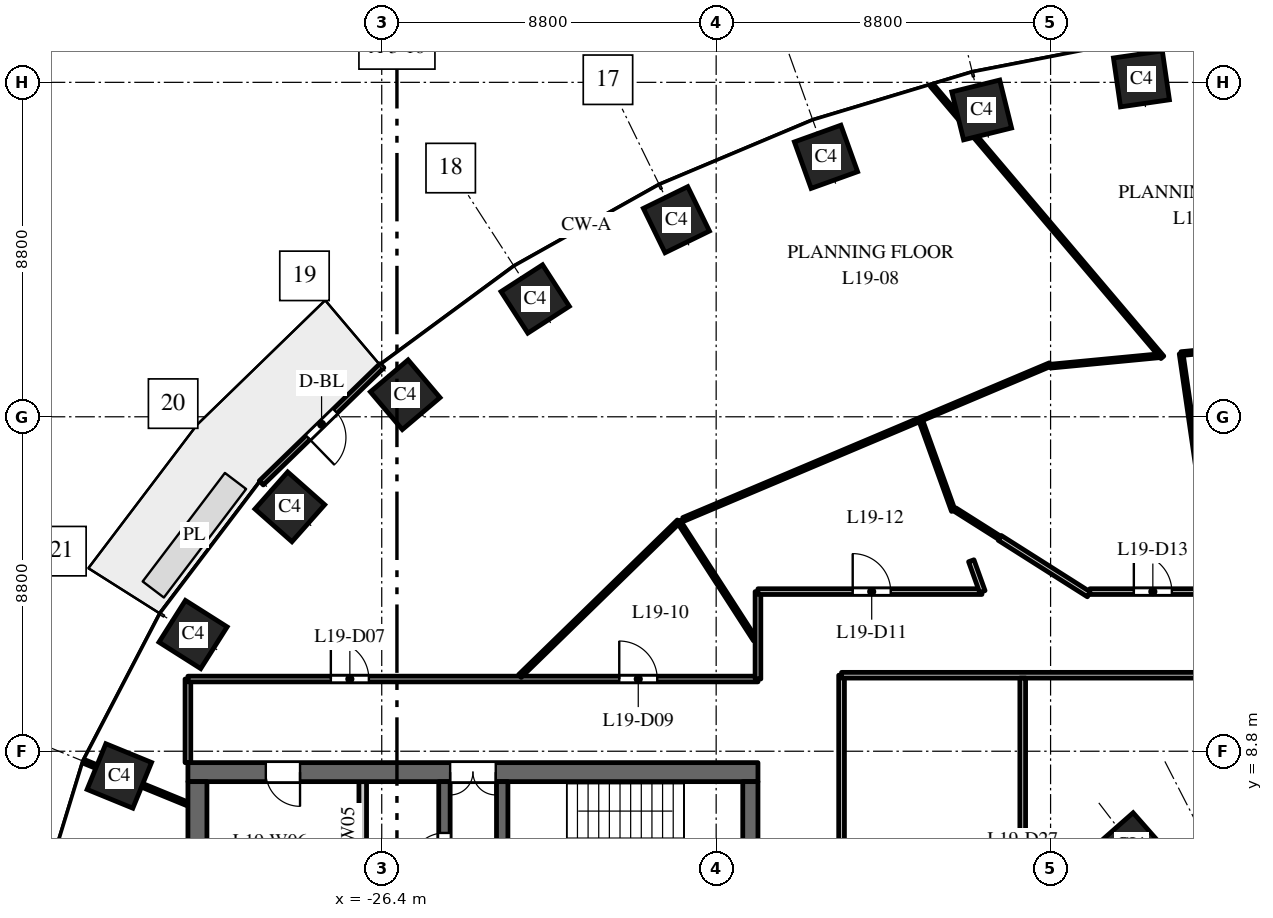
"""IFC4 building model, lengths in metres.
Left out: names, types, materials, properties, quantities, classifications, styles, units other than length and angle.
Written with IfcOpenShell. Run it as: python <this file> out.ifc"""

import sys

from ifc_helpers import new_model, si_unit, direction, frame, frame_2d, origin, origin_2d, place, context, subcontext, project, spatial, rectangle, extrude, element, fill, save


model = new_model("IFC4")
c1 = context("Model", 3, precision=1e-05, world=origin(), true_north=direction((0.0, 1.0)))
c2 = subcontext(c1, "Body", "Model", "MODEL_VIEW")
j1 = project(units=[si_unit("LENGTHUNIT", "METRE"), si_unit("PLANEANGLEUNIT", "RADIAN")], contexts=[c1])
p1 = place(None, origin())
s1 = spatial("IfcSite", under=j1, at=p1, CompositionType="ELEMENT")
p2 = place(p1, origin())
s2 = spatial("IfcBuilding", under=s1, at=p2, CompositionType="ELEMENT")
p3 = place(p2, frame((0.0, 0.0, 88.0)))
s3 = spatial("IfcBuildingStorey", under=s2, at=p3, CompositionType="ELEMENT", Elevation=88.0)
for number, where, z_axis, x_axis in (
    (1, (-6.409, 26.491, 0.0), (0.0, 0.0, 1.0), (-0.99, -0.143, 0.0)),
    (2, (-10.613, 25.674, 0.0), (0.0, 0.0, 1.0), (-0.971, -0.24, 0.0)),
    (3, (-14.709, 24.441, 0.0), (0.0, 0.0, 1.0), (-0.941, -0.338, 0.0)),
    (4, (-18.646, 22.785, 0.0), (0.0, 0.0, 1.0), (-0.898, -0.439, 0.0)),
    (5, (-22.362, 20.7, 0.0), (0.0, 0.0, 1.0), (-0.84, -0.542, 0.0)),
    (6, (-25.783, 18.18, 0.0), (0.0, 0.0, 1.0), (-0.763, -0.646, 0.0)),
    (7, (-28.819, 15.23, 0.0), (0.0, 0.0, 1.0), (-0.663, -0.749, 0.0)),
    (8, (-31.365, 11.871, 0.0), (0.0, 0.0, 1.0), (-0.535, -0.845, 0.0)),
    (9, (-33.305, 8.149, 0.0), (0.0, 0.0, 1.0), (-0.379, -0.925, 0.0)),
):
    element("IfcColumn", number, at=place(p3, frame(where, z_axis=z_axis, x_axis=x_axis)), inside=s3, PredefinedType="COLUMN", context=c2, shape_type="SweptSolid", body=[
        extrude(rectangle(XDim=1.3, YDim=1.3, at=origin_2d()), origin(), (0.0, 0.0, 1.0), 4.0),
    ])
p4 = place(p3, frame((-6.682, 6.334, 0.0), z_axis=(0.0, 0.0, 1.0), x_axis=(-0.75102249095, -0.660276622399, 0.0)))
e10 = element("IfcColumn", 10, at=p4, inside=s3, PredefinedType="COLUMN", context=c2, shape_type="SweptSolid", body=[
    extrude(rectangle(XDim=1.2, YDim=1.2, at=origin_2d()), origin(), (0.0, 0.0, 1.0), 4.0),
])
p5 = place(p3, frame((-16.5, 8.25, 0.0), z_axis=(0.0, 0.0, 1.0), x_axis=(-1.0, 0.0, 0.0)))
e11 = element("IfcWall", 11, at=p5, inside=s3, PredefinedType="SHEAR", context=c2, shape_type="SweptSolid", body=[
    extrude(rectangle(XDim=15.0, YDim=0.5, at=frame_2d((7.5, 0.0))), origin(), (0.0, 0.0, 1.0), 3.7),
])
p6 = place(p5, frame((6.9, 0.0, 0.0)))
e12 = element("IfcOpeningElement", 12, at=p6, cuts=e11, PredefinedType="OPENING", context=c2, shape_type="SweptSolid", body=[
    extrude(rectangle(XDim=1.2, YDim=2.1, at=frame_2d((0.6, 1.05))), frame((0.0, 0.26, 0.0), z_axis=(0.0, -1.0, 0.0), x_axis=(1.0, 0.0, 0.0)), (0.0, 0.0, 1.0), 0.52),
])
p7 = place(p5, frame((12.05, 0.0, 0.0)))
e13 = element("IfcOpeningElement", 13, at=p7, cuts=e11, PredefinedType="OPENING", context=c2, shape_type="SweptSolid", body=[
    extrude(rectangle(XDim=0.9, YDim=2.1, at=frame_2d((0.45, 1.05))), frame((0.0, 0.26, 0.0), z_axis=(0.0, -1.0, 0.0), x_axis=(1.0, 0.0, 0.0)), (0.0, 0.0, 1.0), 0.52),
])
p8 = place(p3, frame((-24.75, -8.0, 0.0), z_axis=(0.0, 0.0, 1.0), x_axis=(0.0, 1.0, 0.0)))
e14 = element("IfcWall", 14, at=p8, inside=s3, PredefinedType="SHEAR", context=c2, shape_type="SweptSolid", body=[
    extrude(rectangle(XDim=16.0, YDim=0.3, at=frame_2d((8.0, 0.0))), origin(), (0.0, 0.0, 1.0), 3.7),
])
p9 = place(p8, frame((4.425, 0.0, 0.0)))
e15 = element("IfcOpeningElement", 15, at=p9, cuts=e14, PredefinedType="OPENING", context=c2, shape_type="SweptSolid", body=[
    extrude(rectangle(XDim=1.1, YDim=2.1, at=frame_2d((0.55, 1.05))), frame((0.0, 0.16, 0.0), z_axis=(0.0, -1.0, 0.0), x_axis=(1.0, 0.0, 0.0)), (0.0, 0.0, 1.0), 0.32),
])
p10 = place(p8, frame((7.45, 0.0, 0.0)))
e16 = element("IfcOpeningElement", 16, at=p10, cuts=e14, PredefinedType="OPENING", context=c2, shape_type="SweptSolid", body=[
    extrude(rectangle(XDim=1.1, YDim=2.1, at=frame_2d((0.55, 1.05))), frame((0.0, 0.16, 0.0), z_axis=(0.0, -1.0, 0.0), x_axis=(1.0, 0.0, 0.0)), (0.0, 0.0, 1.0), 0.32),
])
p11 = place(p8, frame((10.425, 0.0, 0.0)))
e17 = element("IfcOpeningElement", 17, at=p11, cuts=e14, PredefinedType="OPENING", context=c2, shape_type="SweptSolid", body=[
    extrude(rectangle(XDim=1.2, YDim=2.1, at=frame_2d((0.6, 1.05))), frame((0.0, 0.16, 0.0), z_axis=(0.0, -1.0, 0.0), x_axis=(1.0, 0.0, 0.0)), (0.0, 0.0, 1.0), 0.32),
])
p12 = place(p8, frame((13.75, 0.0, 0.0)))
e18 = element("IfcOpeningElement", 18, at=p12, cuts=e14, PredefinedType="OPENING", context=c2, shape_type="SweptSolid", body=[
    extrude(rectangle(XDim=0.9, YDim=2.1, at=frame_2d((0.45, 1.05))), frame((0.0, 0.16, 0.0), z_axis=(0.0, -1.0, 0.0), x_axis=(1.0, 0.0, 0.0)), (0.0, 0.0, 1.0), 0.32),
])
p13 = place(p8, frame((1.35, 0.0, 0.0)))
e19 = element("IfcOpeningElement", 19, at=p13, cuts=e14, PredefinedType="OPENING", context=c2, shape_type="SweptSolid", body=[
    extrude(rectangle(XDim=0.9, YDim=2.1, at=frame_2d((0.45, 1.05))), frame((0.0, 0.16, 0.0), z_axis=(0.0, -1.0, 0.0), x_axis=(1.0, 0.0, 0.0)), (0.0, 0.0, 1.0), 0.32),
])
p14 = place(p3, frame((-16.7, -8.0, 0.0), z_axis=(0.0, 0.0, 1.0), x_axis=(0.0, 1.0, 0.0)))
e20 = element("IfcWall", 20, at=p14, inside=s3, PredefinedType="SHEAR", context=c2, shape_type="SweptSolid", body=[
    extrude(rectangle(XDim=16.0, YDim=0.4, at=frame_2d((8.0, 0.0))), origin(), (0.0, 0.0, 1.0), 3.7),
])
p15 = place(p3, frame((-31.25, -8.0, 0.0), z_axis=(0.0, 0.0, 1.0), x_axis=(0.0, 1.0, 0.0)))
e21 = element("IfcWall", 21, at=p15, inside=s3, PredefinedType="SHEAR", context=c2, shape_type="SweptSolid", body=[
    extrude(rectangle(XDim=16.0, YDim=0.5, at=frame_2d((8.0, 0.0))), origin(), (0.0, 0.0, 1.0), 3.7),
])
p16 = place(p3, frame((-26.9, 4.75, 0.0), z_axis=(0.0, 0.0, 1.0), x_axis=(0.0, 1.0, 0.0)))
e22 = element("IfcWall", 22, at=p16, inside=s3, PredefinedType="PARTITIONING", context=c2, shape_type="SweptSolid", body=[
    extrude(rectangle(XDim=3.25, YDim=0.2, at=frame_2d((1.625, 0.0))), origin(), (0.0, 0.0, 1.0), 3.7),
])
p17 = place(p3, frame((-23.23, 2.25, 0.0), z_axis=(0.0, 0.0, 1.0), x_axis=(0.0, 1.0, 0.0)))
e23 = element("IfcWall", 23, at=p17, inside=s3, PredefinedType="SHEAR", context=c2, shape_type="SweptSolid", body=[
    extrude(rectangle(XDim=5.75, YDim=0.3, at=frame_2d((2.875, 0.0))), origin(), (0.0, 0.0, 1.0), 3.7),
])
p18 = place(p17, frame((0.6, 0.0, 0.0)))
e24 = element("IfcOpeningElement", 24, at=p18, cuts=e23, PredefinedType="OPENING", context=c2, shape_type="SweptSolid", body=[
    extrude(rectangle(XDim=1.0, YDim=2.1, at=frame_2d((0.5, 1.05))), frame((0.0, 0.16, 0.0), z_axis=(0.0, -1.0, 0.0), x_axis=(1.0, 0.0, 0.0)), (0.0, 0.0, 1.0), 0.32),
])
p19 = place(p3, frame((-26.396, 18.943, 0.0), z_axis=(0.0, 0.0, 1.0), x_axis=(-0.717214761864, -0.696852197647, 0.0)))
e25 = element("IfcWall", 25, at=p19, inside=s3, PredefinedType="STANDARD", context=c2, shape_type="SweptSolid", body=[
    extrude(rectangle(XDim=4.424, YDim=0.15, at=frame_2d((2.212, 0.0))), origin(), (0.0, 0.0, 1.0), 3.7),
])
p20 = place(p19, frame((1.712, 0.0, 0.0)))
e26 = element("IfcOpeningElement", 26, at=p20, cuts=e25, PredefinedType="OPENING", context=c2, shape_type="SweptSolid", body=[
    extrude(rectangle(XDim=1.0, YDim=2.4, at=frame_2d((0.5, 1.2))), frame((0.0, 0.085, 0.0), z_axis=(0.0, -1.0, 0.0), x_axis=(1.0, 0.0, 0.0)), (0.0, 0.0, 1.0), 0.17),
])
p21 = place(p3, frame((-34.234, 8.53, 0.0), z_axis=(0.0, 0.0, 1.0), x_axis=(0.925344112436, -0.379128307542, 0.0)))
e27 = element("IfcWall", 27, at=p21, inside=s3, PredefinedType="PARTITIONING", context=c2, shape_type="SweptSolid", body=[
    extrude(rectangle(XDim=2.954, YDim=0.1, at=frame_2d((1.477, 0.0))), origin(), (0.0, 0.0, 1.0), 2.9),
])
p22 = place(p3, frame((-31.5, 8.5, 0.0), z_axis=(0.0, 0.0, 1.0), x_axis=(0.0, 1.0, 0.0)))
e28 = element("IfcWall", 28, at=p22, inside=s3, PredefinedType="PARTITIONING", context=c2, shape_type="SweptSolid", body=[
    extrude(rectangle(XDim=2.2, YDim=0.15, at=frame_2d((1.1, 0.0))), origin(), (0.0, 0.0, 1.0), 3.7),
])
p23 = place(p3, frame((-31.5, 10.7, 0.0), z_axis=(0.0, 0.0, 1.0), x_axis=(1.0, 0.0, 0.0)))
e29 = element("IfcWall", 29, at=p23, inside=s3, PredefinedType="PARTITIONING", context=c2, shape_type="SweptSolid", body=[
    extrude(rectangle(XDim=15.0, YDim=0.15, at=frame_2d((7.5, 0.0))), origin(), (0.0, 0.0, 1.0), 3.1),
])
p24 = place(p23, frame((3.761, 0.0, 0.0)))
e30 = element("IfcOpeningElement", 30, at=p24, cuts=e29, PredefinedType="OPENING", context=c2, shape_type="SweptSolid", body=[
    extrude(rectangle(XDim=1.0, YDim=2.1, at=frame_2d((0.5, 1.05))), frame((0.0, 0.085, 0.0), z_axis=(0.0, -1.0, 0.0), x_axis=(1.0, 0.0, 0.0)), (0.0, 0.0, 1.0), 0.17),
])
p25 = place(p23, frame((11.35, 0.0, 0.0)))
e31 = element("IfcOpeningElement", 31, at=p25, cuts=e29, PredefinedType="OPENING", context=c2, shape_type="SweptSolid", body=[
    extrude(rectangle(XDim=1.0, YDim=2.1, at=frame_2d((0.5, 1.05))), frame((0.0, 0.085, 0.0), z_axis=(0.0, -1.0, 0.0), x_axis=(1.0, 0.0, 0.0)), (0.0, 0.0, 1.0), 0.17),
])
p26 = place(p3, frame((-22.765, 10.778, 0.0), z_axis=(0.0, 0.0, 1.0), x_axis=(0.716294479598, 0.697798121592, 0.0)))
e32 = element("IfcWall", 32, at=p26, inside=s3, PredefinedType="PARTITIONING", context=c2, shape_type="SweptSolid", body=[
    extrude(rectangle(XDim=5.834, YDim=0.1, at=frame_2d((2.917, 0.0))), origin(), (0.0, 0.0, 1.0), 2.75),
])
p27 = place(p3, frame((-18.586, 14.849, 0.0), z_axis=(0.0, 0.0, 1.0), x_axis=(0.542227325377, -0.840231829684, 0.0)))
e33 = element("IfcWall", 33, at=p27, inside=s3, PredefinedType="PARTITIONING", context=c2, shape_type="SweptSolid", body=[
    extrude(rectangle(XDim=3.709, YDim=0.1, at=frame_2d((1.854, 0.0))), origin(), (0.0, 0.0, 1.0), 2.75),
])
p28 = place(p3, frame((-18.46, 14.902, 0.0), z_axis=(0.0, 0.0, 1.0), x_axis=(0.921302833786, 0.388845841508, 0.0)))
e34 = element("IfcWall", 34, at=p28, inside=s3, PredefinedType="PARTITIONING", context=c2, shape_type="SweptSolid", body=[
    extrude(rectangle(XDim=10.472, YDim=0.1, at=frame_2d((5.236, 0.0))), origin(), (0.0, 0.0, 1.0), 2.85),
])
p29 = place(p3, frame((-16.5, 10.7, 0.0), z_axis=(0.0, 0.0, 1.0), x_axis=(0.0, 1.0, 0.0)))
e35 = element("IfcWall", 35, at=p29, inside=s3, PredefinedType="PARTITIONING", context=c2, shape_type="SweptSolid", body=[
    extrude(rectangle(XDim=2.3, YDim=0.15, at=frame_2d((1.15, 0.0))), origin(), (0.0, 0.0, 1.0), 2.75),
])
p30 = place(p3, frame((-16.5, 13.0, 0.0), z_axis=(0.0, 0.0, 1.0), x_axis=(1.0, 0.0, 0.0)))
e36 = element("IfcWall", 36, at=p30, inside=s3, PredefinedType="PARTITIONING", context=c2, shape_type="SweptSolid", body=[
    extrude(rectangle(XDim=5.893, YDim=0.15, at=frame_2d((2.947, 0.0))), origin(), (0.0, 0.0, 1.0), 2.85),
])
p31 = place(p30, frame((2.493, 0.0, 0.0)))
e37 = element("IfcOpeningElement", 37, at=p31, cuts=e36, PredefinedType="OPENING", context=c2, shape_type="SweptSolid", body=[
    extrude(rectangle(XDim=1.0, YDim=2.1, at=frame_2d((0.5, 1.05))), frame((0.0, 0.085, 0.0), z_axis=(0.0, -1.0, 0.0), x_axis=(1.0, 0.0, 0.0)), (0.0, 0.0, 1.0), 0.17),
])
p32 = place(p3, frame((-14.3, -10.8, 0.0), z_axis=(0.0, 0.0, 1.0), x_axis=(0.0, 1.0, 0.0)))
e38 = element("IfcWall", 38, at=p32, inside=s3, PredefinedType="PARTITIONING", context=c2, shape_type="SweptSolid", body=[
    extrude(rectangle(XDim=21.6, YDim=0.15, at=frame_2d((10.8, 0.0))), origin(), (0.0, 0.0, 1.0), 2.75),
])
p33 = place(p32, frame((10.4, 0.0, 0.0)))
e39 = element("IfcOpeningElement", 39, at=p33, cuts=e38, PredefinedType="OPENING", context=c2, shape_type="SweptSolid", body=[
    extrude(rectangle(XDim=1.0, YDim=2.1, at=frame_2d((0.5, 1.05))), frame((0.0, 0.085, 0.0), z_axis=(0.0, -1.0, 0.0), x_axis=(1.0, 0.0, 0.0)), (0.0, 0.0, 1.0), 0.17),
])
p34 = place(p3, frame((-14.3, 10.8, 0.0), z_axis=(0.0, 0.0, 1.0), x_axis=(1.0, 0.0, 0.0)))
e40 = element("IfcWall", 40, at=p34, inside=s3, PredefinedType="PARTITIONING", context=c2, shape_type="SweptSolid", body=[
    extrude(rectangle(XDim=28.6, YDim=0.15, at=frame_2d((14.3, 0.0))), origin(), (0.0, 0.0, 1.0), 2.85),
])
p35 = place(p34, frame((11.433, 0.0, 0.0)))
e41 = element("IfcOpeningElement", 41, at=p35, cuts=e40, PredefinedType="OPENING", context=c2, shape_type="SweptSolid", body=[
    extrude(rectangle(XDim=1.0, YDim=2.1, at=frame_2d((0.5, 1.05))), frame((0.0, 0.085, 0.0), z_axis=(0.0, -1.0, 0.0), x_axis=(1.0, 0.0, 0.0)), (0.0, 0.0, 1.0), 0.17),
])
p36 = place(p34, frame((16.2, 0.0, 0.0)))
e42 = element("IfcOpeningElement", 42, at=p36, cuts=e40, PredefinedType="OPENING", context=c2, shape_type="SweptSolid", body=[
    extrude(rectangle(XDim=1.0, YDim=2.1, at=frame_2d((0.5, 1.05))), frame((0.0, 0.085, 0.0), z_axis=(0.0, -1.0, 0.0), x_axis=(1.0, 0.0, 0.0)), (0.0, 0.0, 1.0), 0.17),
])
p37 = place(p34, frame((20.967, 0.0, 0.0)))
e43 = element("IfcOpeningElement", 43, at=p37, cuts=e40, PredefinedType="OPENING", context=c2, shape_type="SweptSolid", body=[
    extrude(rectangle(XDim=1.0, YDim=2.1, at=frame_2d((0.5, 1.05))), frame((0.0, 0.085, 0.0), z_axis=(0.0, -1.0, 0.0), x_axis=(1.0, 0.0, 0.0)), (0.0, 0.0, 1.0), 0.17),
])
p38 = place(p3, frame((-12.209, 17.486, 0.0), z_axis=(0.0, 0.0, 1.0), x_axis=(0.338698771758, -0.940894862357, 0.0)))
e44 = element("IfcWall", 44, at=p38, inside=s3, PredefinedType="PARTITIONING", context=c2, shape_type="SweptSolid", body=[
    extrude(rectangle(XDim=2.506, YDim=0.1, at=frame_2d((1.253, 0.0))), origin(), (0.0, 0.0, 1.0), 3.7),
])
p39 = place(p3, frame((-11.925, 26.323, 0.0), z_axis=(0.0, 0.0, 1.0), x_axis=(0.646476265577, -0.762934098101, 0.0)))
e45 = element("IfcWall", 45, at=p39, inside=s3, PredefinedType="PARTITIONING", context=c2, shape_type="SweptSolid", body=[
    extrude(rectangle(XDim=9.384, YDim=0.1, at=frame_2d((4.692, 0.0))), origin(), (0.0, 0.0, 1.0), 2.85),
])
p40 = place(p3, frame((-11.319, 15.161, 0.0), z_axis=(0.0, 0.0, 1.0), x_axis=(0.845102975348, -0.534603555037, 0.0)))
e46 = element("IfcWall", 46, at=p40, inside=s3, PredefinedType="PARTITIONING", context=c2, shape_type="SweptSolid", body=[
    extrude(rectangle(XDim=1.399, YDim=0.1, at=frame_2d((0.699, 0.0))), origin(), (0.0, 0.0, 1.0), 3.7),
])
p41 = place(p3, frame((-10.887, 13.812, 0.0), z_axis=(0.0, 0.0, 1.0), x_axis=(0.338378813476, -0.941009977944, 0.0)))
e47 = element("IfcWall", 47, at=p41, inside=s3, PredefinedType="PARTITIONING", context=c2, shape_type="SweptSolid", body=[
    extrude(rectangle(XDim=0.863, YDim=0.15, at=frame_2d((0.432, 0.0))), origin(), (0.0, 0.0, 1.0), 2.85),
])
p42 = place(p3, frame((-10.137, 14.413, 0.0), z_axis=(0.0, 0.0, 1.0), x_axis=(0.844666662568, -0.535292657475, 0.0)))
e48 = element("IfcWall", 48, at=p42, inside=s3, PredefinedType="PARTITIONING", context=c2, shape_type="SweptSolid", body=[
    extrude(rectangle(XDim=2.776, YDim=0.15, at=frame_2d((1.388, 0.0))), origin(), (0.0, 0.0, 1.0), 3.7),
])
p43 = place(p3, frame((-9.533, -10.725, 0.0), z_axis=(0.0, 0.0, 1.0), x_axis=(0.0, 1.0, 0.0)))
e49 = element("IfcWall", 49, at=p43, inside=s3, PredefinedType="PARTITIONING", context=c2, shape_type="SweptSolid", body=[
    extrude(rectangle(XDim=21.45, YDim=0.15, at=frame_2d((10.725, 0.0))), origin(), (0.0, 0.0, 1.0), 2.75),
])
p44 = place(p43, frame((15.575, 0.0, 0.0)))
e50 = element("IfcOpeningElement", 50, at=p44, cuts=e49, PredefinedType="OPENING", context=c2, shape_type="SweptSolid", body=[
    extrude(rectangle(XDim=1.0, YDim=2.1, at=frame_2d((0.5, 1.05))), frame((0.0, 0.085, 0.0), z_axis=(0.0, -1.0, 0.0), x_axis=(1.0, 0.0, 0.0)), (0.0, 0.0, 1.0), 0.17),
])
p45 = place(p3, frame((-8.802, 18.932, 0.0), z_axis=(0.0, 0.0, 1.0), x_axis=(0.995447320833, 0.095313332995, 0.0)))
e51 = element("IfcWall", 51, at=p45, inside=s3, PredefinedType="PARTITIONING", context=c2, shape_type="SweptSolid", body=[
    extrude(rectangle(XDim=2.856, YDim=0.1, at=frame_2d((1.428, 0.0))), origin(), (0.0, 0.0, 1.0), 2.85),
])
p46 = place(p3, frame((-7.767, 13.0, 0.0), z_axis=(0.0, 0.0, 1.0), x_axis=(1.0, 0.0, 0.0)))
e52 = element("IfcWall", 52, at=p46, inside=s3, PredefinedType="PARTITIONING", context=c2, shape_type="SweptSolid", body=[
    extrude(rectangle(XDim=3.288, YDim=0.15, at=frame_2d((1.644, 0.0))), origin(), (0.0, 0.0, 1.0), 2.85),
])
p47 = place(p46, frame((1.158, 0.0, 0.0)))
e53 = element("IfcOpeningElement", 53, at=p47, cuts=e52, PredefinedType="OPENING", context=c2, shape_type="SweptSolid", body=[
    extrude(rectangle(XDim=1.0, YDim=2.1, at=frame_2d((0.5, 1.05))), frame((0.0, 0.085, 0.0), z_axis=(0.0, -1.0, 0.0), x_axis=(1.0, 0.0, 0.0)), (0.0, 0.0, 1.0), 0.17),
])
p48 = place(p3, frame((-5.364, 19.261, 0.0), z_axis=(0.0, 0.0, 1.0), x_axis=(0.143605013025, -0.989635084379, 0.0)))
e54 = element("IfcWall", 54, at=p48, inside=s3, PredefinedType="PARTITIONING", context=c2, shape_type="SweptSolid", body=[
    extrude(rectangle(XDim=6.323, YDim=0.1, at=frame_2d((3.161, 0.0))), origin(), (0.0, 0.0, 1.0), 3.7),
])
p49 = place(p3, frame((-5.364, 19.262, 0.0), z_axis=(0.0, 0.0, 1.0), x_axis=(0.995470221286, 0.095073858302, 0.0)))
e55 = element("IfcWall", 55, at=p49, inside=s3, PredefinedType="PARTITIONING", context=c2, shape_type="SweptSolid", body=[
    extrude(rectangle(XDim=4.787, YDim=0.1, at=frame_2d((2.393, 0.0))), origin(), (0.0, 0.0, 1.0), 2.85),
])
p50 = place(p6, origin())
e56 = element("IfcDoor", 56, at=p50, inside=s3, OperationType="DOUBLE_DOOR_DOUBLE_SWING", PredefinedType="DOOR", context=c2, shape_type="SweptSolid", body=[
    extrude(rectangle(XDim=1.2, YDim=2.1, at=frame_2d((0.6, 1.05))), frame((0.0, 0.025, 0.0), z_axis=(0.0, -1.0, 0.0), x_axis=(1.0, 0.0, 0.0)), (0.0, 0.0, 1.0), 0.05),
])
fill(e12, e56)
p51 = place(p12, origin())
e57 = element("IfcDoor", 57, at=p51, inside=s3, OperationType="SINGLE_SWING_RIGHT", PredefinedType="DOOR", context=c2, shape_type="SweptSolid", body=[
    extrude(rectangle(XDim=0.9, YDim=2.1, at=frame_2d((0.45, 1.05))), frame((0.0, 0.025, 0.0), z_axis=(0.0, -1.0, 0.0), x_axis=(1.0, 0.0, 0.0)), (0.0, 0.0, 1.0), 0.05),
])
fill(e18, e57)
p52 = place(p7, origin())
e58 = element("IfcDoor", 58, at=p52, inside=s3, OperationType="SINGLE_SWING_RIGHT", PredefinedType="DOOR", context=c2, shape_type="SweptSolid", body=[
    extrude(rectangle(XDim=0.9, YDim=2.1, at=frame_2d((0.45, 1.05))), frame((0.0, 0.025, 0.0), z_axis=(0.0, -1.0, 0.0), x_axis=(1.0, 0.0, 0.0)), (0.0, 0.0, 1.0), 0.05),
])
fill(e13, e58)
p53 = place(p20, origin())
e59 = element("IfcDoor", 59, at=p53, inside=s3, OperationType="SINGLE_SWING_RIGHT", PredefinedType="DOOR", context=c2, shape_type="SweptSolid", body=[
    extrude(rectangle(XDim=1.0, YDim=2.4, at=frame_2d((0.5, 1.2))), frame((0.0, 0.025, 0.0), z_axis=(0.0, -1.0, 0.0), x_axis=(1.0, 0.0, 0.0)), (0.0, 0.0, 1.0), 0.05),
])
fill(e26, e59)
p54 = place(p24, origin())
e60 = element("IfcDoor", 60, at=p54, inside=s3, OperationType="SINGLE_SWING_LEFT", PredefinedType="DOOR", context=c2, shape_type="SweptSolid", body=[
    extrude(rectangle(XDim=1.0, YDim=2.1, at=frame_2d((0.5, 1.05))), frame((0.0, 0.025, 0.0), z_axis=(0.0, -1.0, 0.0), x_axis=(1.0, 0.0, 0.0)), (0.0, 0.0, 1.0), 0.05),
])
fill(e30, e60)
p55 = place(p25, origin())
e61 = element("IfcDoor", 61, at=p55, inside=s3, OperationType="SINGLE_SWING_LEFT", PredefinedType="DOOR", context=c2, shape_type="SweptSolid", body=[
    extrude(rectangle(XDim=1.0, YDim=2.1, at=frame_2d((0.5, 1.05))), frame((0.0, 0.025, 0.0), z_axis=(0.0, -1.0, 0.0), x_axis=(1.0, 0.0, 0.0)), (0.0, 0.0, 1.0), 0.05),
])
fill(e31, e61)
p56 = place(p31, origin())
e62 = element("IfcDoor", 62, at=p56, inside=s3, OperationType="SINGLE_SWING_LEFT", PredefinedType="DOOR", context=c2, shape_type="SweptSolid", body=[
    extrude(rectangle(XDim=1.0, YDim=2.1, at=frame_2d((0.5, 1.05))), frame((0.0, 0.025, 0.0), z_axis=(0.0, -1.0, 0.0), x_axis=(1.0, 0.0, 0.0)), (0.0, 0.0, 1.0), 0.05),
])
fill(e37, e62)
p57 = place(p47, origin())
e63 = element("IfcDoor", 63, at=p57, inside=s3, OperationType="SINGLE_SWING_LEFT", PredefinedType="DOOR", context=c2, shape_type="SweptSolid", body=[
    extrude(rectangle(XDim=1.0, YDim=2.1, at=frame_2d((0.5, 1.05))), frame((0.0, 0.025, 0.0), z_axis=(0.0, -1.0, 0.0), x_axis=(1.0, 0.0, 0.0)), (0.0, 0.0, 1.0), 0.05),
])
fill(e53, e63)
save(model, sys.argv[1])
